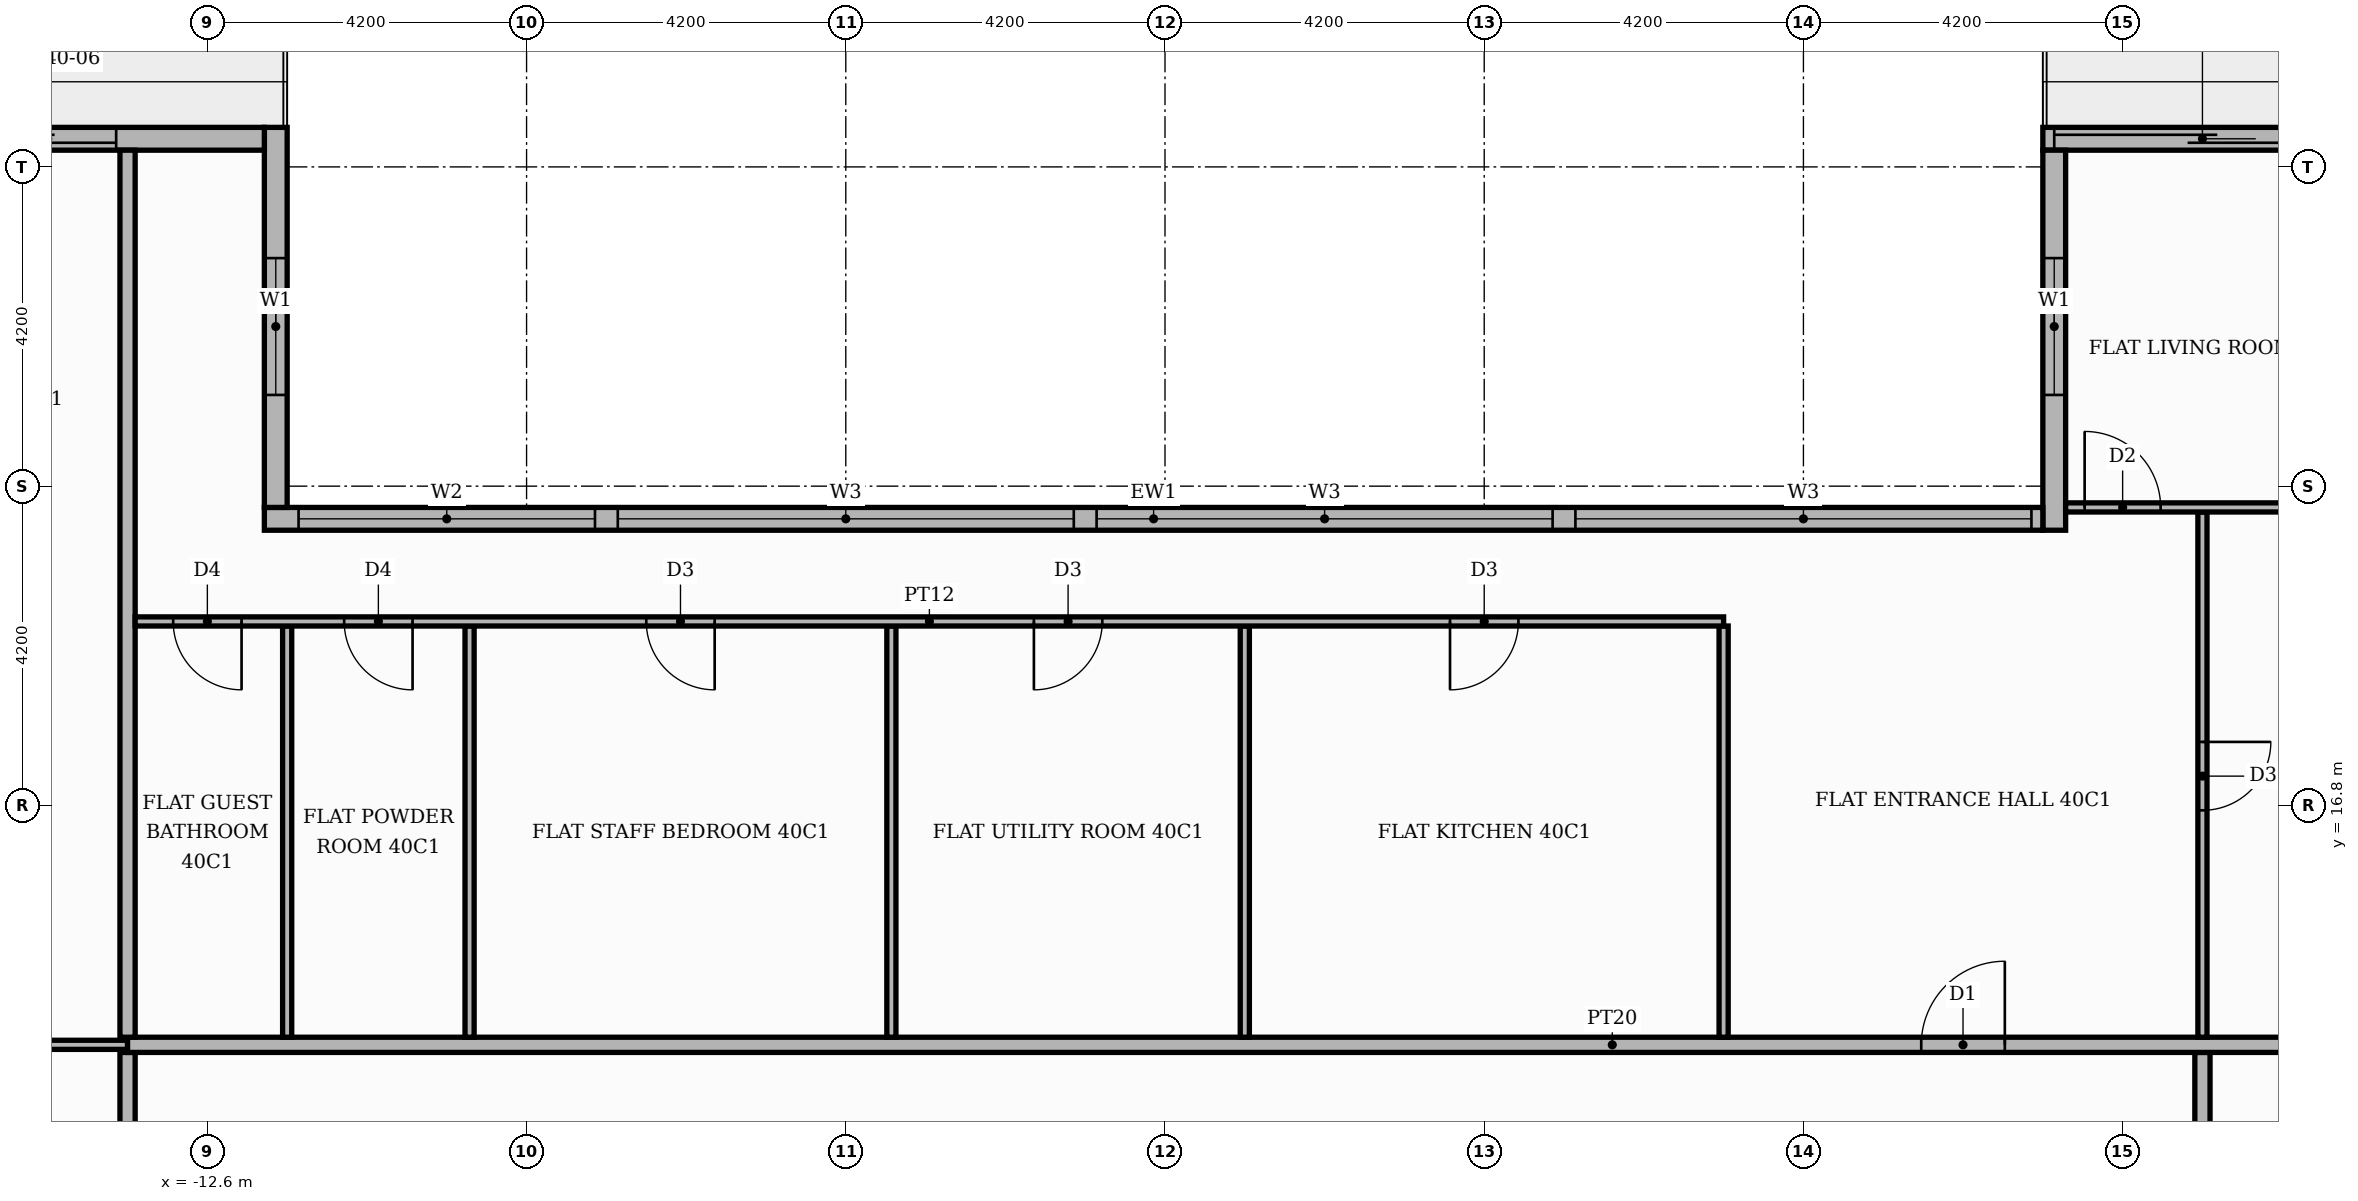
"""IFC4 building model, lengths in metres.
Left out: names, types, materials, properties, quantities, classifications, styles, units other than length and angle.
Written with IfcOpenShell. Run it as: python <this file> out.ifc"""

import sys

from ifc_helpers import new_model, si_unit, direction, frame, frame_2d, origin, place, context, subcontext, project, spatial, rectangle, extrude, element, fill, save


model = new_model("IFC4")
c1 = context("Model", 3, precision=1e-05, world=origin(), true_north=direction((0.0, 1.0)))
c2 = subcontext(c1, "Body", "Model", "MODEL_VIEW")
j1 = project(units=[si_unit("LENGTHUNIT", "METRE"), si_unit("PLANEANGLEUNIT", "RADIAN")], contexts=[c1])
p1 = place(None, origin())
s1 = spatial("IfcSite", under=j1, at=p1, CompositionType="ELEMENT")
p2 = place(p1, origin())
s2 = spatial("IfcBuilding", under=s1, at=p2, CompositionType="ELEMENT")
p3 = place(p2, frame((0.0, 0.0, 168.9)))
s3 = spatial("IfcBuildingStorey", under=s2, at=p3, CompositionType="ELEMENT", Elevation=168.9)
p4 = place(p3, frame((16.2, 25.57, 0.0), z_axis=(0.0, 0.0, 1.0), x_axis=(-1.0, 0.0, 0.0)))
e1 = element("IfcWall", 1, at=p4, inside=s3, PredefinedType="STANDARD", context=c2, shape_type="SweptSolid", body=[
    extrude(rectangle(XDim=4.65, YDim=0.3, at=frame_2d((2.325, 0.0))), origin(), (0.0, 0.0, 1.0), 3.48),
])
p5 = place(p4, frame((0.6, 0.0, 0.0)))
e2 = element("IfcOpeningElement", 2, at=p5, cuts=e1, PredefinedType="OPENING", context=c2, shape_type="SweptSolid", body=[
    extrude(rectangle(XDim=3.9, YDim=2.4, at=frame_2d((1.95, 1.2))), frame((0.0, 0.16, 0.0), z_axis=(0.0, -1.0, 0.0), x_axis=(1.0, 0.0, 0.0)), (0.0, 0.0, 1.0), 0.32),
])
p6 = place(p3, frame((11.7, 25.42, 0.0), z_axis=(0.0, 0.0, 1.0), x_axis=(0.0, -1.0, 0.0)))
e3 = element("IfcWall", 3, at=p6, inside=s3, PredefinedType="STANDARD", context=c2, shape_type="SweptSolid", body=[
    extrude(rectangle(XDim=5.0, YDim=0.3, at=frame_2d((2.5, 0.0))), origin(), (0.0, 0.0, 1.0), 3.48),
])
p7 = place(p6, frame((1.42, 0.0, 0.9)))
e4 = element("IfcOpeningElement", 4, at=p7, cuts=e3, PredefinedType="OPENING", context=c2, shape_type="SweptSolid", body=[
    extrude(rectangle(XDim=1.8, YDim=2.1, at=frame_2d((0.9, 1.05))), frame((0.0, 0.16, 0.0), z_axis=(0.0, -1.0, 0.0), x_axis=(1.0, 0.0, 0.0)), (0.0, 0.0, 1.0), 0.32),
])
p8 = place(p3, frame((11.55, 20.57, 0.0), z_axis=(0.0, 0.0, 1.0), x_axis=(-1.0, 0.0, 0.0)))
e5 = element("IfcWall", 5, at=p8, inside=s3, PredefinedType="STANDARD", context=c2, shape_type="SweptSolid", body=[
    extrude(rectangle(XDim=23.4, YDim=0.3, at=frame_2d((11.7, 0.0))), origin(), (0.0, 0.0, 1.0), 3.48),
])
p9 = place(p8, frame((0.15, 0.0, 0.9)))
e6 = element("IfcOpeningElement", 6, at=p9, cuts=e5, PredefinedType="OPENING", context=c2, shape_type="SweptSolid", body=[
    extrude(rectangle(XDim=6.0, YDim=2.1, at=frame_2d((3.0, 1.05))), frame((0.0, 0.16, 0.0), z_axis=(0.0, -1.0, 0.0), x_axis=(1.0, 0.0, 0.0)), (0.0, 0.0, 1.0), 0.32),
])
p10 = place(p8, frame((6.45, 0.0, 0.9)))
e7 = element("IfcOpeningElement", 7, at=p10, cuts=e5, PredefinedType="OPENING", context=c2, shape_type="SweptSolid", body=[
    extrude(rectangle(XDim=6.0, YDim=2.1, at=frame_2d((3.0, 1.05))), frame((0.0, 0.16, 0.0), z_axis=(0.0, -1.0, 0.0), x_axis=(1.0, 0.0, 0.0)), (0.0, 0.0, 1.0), 0.32),
])
p11 = place(p8, frame((12.75, 0.0, 0.9)))
e8 = element("IfcOpeningElement", 8, at=p11, cuts=e5, PredefinedType="OPENING", context=c2, shape_type="SweptSolid", body=[
    extrude(rectangle(XDim=6.0, YDim=2.1, at=frame_2d((3.0, 1.05))), frame((0.0, 0.16, 0.0), z_axis=(0.0, -1.0, 0.0), x_axis=(1.0, 0.0, 0.0)), (0.0, 0.0, 1.0), 0.32),
])
p12 = place(p8, frame((19.05, 0.0, 0.9)))
e9 = element("IfcOpeningElement", 9, at=p12, cuts=e5, PredefinedType="OPENING", context=c2, shape_type="SweptSolid", body=[
    extrude(rectangle(XDim=3.9, YDim=2.1, at=frame_2d((1.95, 1.05))), frame((0.0, 0.16, 0.0), z_axis=(0.0, -1.0, 0.0), x_axis=(1.0, 0.0, 0.0)), (0.0, 0.0, 1.0), 0.32),
])
p13 = place(p3, frame((-11.7, 20.72, 0.0), z_axis=(0.0, 0.0, 1.0), x_axis=(0.0, 1.0, 0.0)))
e10 = element("IfcWall", 10, at=p13, inside=s3, PredefinedType="STANDARD", context=c2, shape_type="SweptSolid", body=[
    extrude(rectangle(XDim=5.0, YDim=0.3, at=frame_2d((2.5, 0.0))), origin(), (0.0, 0.0, 1.0), 3.48),
])
p14 = place(p13, frame((1.48, 0.0, 0.9)))
e11 = element("IfcOpeningElement", 11, at=p14, cuts=e10, PredefinedType="OPENING", context=c2, shape_type="SweptSolid", body=[
    extrude(rectangle(XDim=1.8, YDim=2.1, at=frame_2d((0.9, 1.05))), frame((0.0, 0.16, 0.0), z_axis=(0.0, -1.0, 0.0), x_axis=(1.0, 0.0, 0.0)), (0.0, 0.0, 1.0), 0.32),
])
p15 = place(p3, frame((-11.85, 25.57, 0.0), z_axis=(0.0, 0.0, 1.0), x_axis=(-1.0, 0.0, 0.0)))
e12 = element("IfcWall", 12, at=p15, inside=s3, PredefinedType="STANDARD", context=c2, shape_type="SweptSolid", body=[
    extrude(rectangle(XDim=4.35, YDim=0.3, at=frame_2d((2.175, 0.0))), origin(), (0.0, 0.0, 1.0), 3.48),
])
p16 = place(p15, frame((1.95, 0.0, 0.0)))
e13 = element("IfcOpeningElement", 13, at=p16, cuts=e12, PredefinedType="OPENING", context=c2, shape_type="SweptSolid", body=[
    extrude(rectangle(XDim=1.8, YDim=2.4, at=frame_2d((0.9, 1.2))), frame((0.0, 0.16, 0.0), z_axis=(0.0, -1.0, 0.0), x_axis=(1.0, 0.0, 0.0)), (0.0, 0.0, 1.0), 0.32),
])
for number, where, z_axis, x_axis in (
    (14, (-13.65, 11.1, 0.0), (0.0, 0.0, 1.0), (0.0, 1.0, 0.0)),
    (15, (13.65, 11.1, 0.0), (0.0, 0.0, 1.0), (0.0, 1.0, 0.0)),
):
    element("IfcWall", number, at=place(p3, frame(where, z_axis=z_axis, x_axis=x_axis)), inside=s3, PredefinedType="PARTITIONING", context=c2, shape_type="SweptSolid", body=[
        extrude(rectangle(XDim=2.45, YDim=0.2, at=frame_2d((1.225, 0.0))), origin(), (0.0, 0.0, 1.0), 3.48),
    ])
p17 = place(p3, frame((-20.72, 13.65, 0.0), z_axis=(0.0, 0.0, 1.0), x_axis=(1.0, 0.0, 0.0)))
e16 = element("IfcWall", 16, at=p17, inside=s3, PredefinedType="PARTITIONING", context=c2, shape_type="SweptSolid", body=[
    extrude(rectangle(XDim=7.07, YDim=0.12, at=frame_2d((3.535, 0.0))), origin(), (0.0, 0.0, 1.0), 3.48),
])
p18 = place(p17, frame((3.085, 0.0, 0.0)))
e17 = element("IfcOpeningElement", 17, at=p18, cuts=e16, PredefinedType="OPENING", context=c2, shape_type="SweptSolid", body=[
    extrude(rectangle(XDim=0.9, YDim=2.1, at=frame_2d((0.45, 1.05))), frame((0.0, 0.07, 0.0), z_axis=(0.0, -1.0, 0.0), x_axis=(1.0, 0.0, 0.0)), (0.0, 0.0, 1.0), 0.14),
])
p19 = place(p3, frame((-13.65, 13.65, 0.0), z_axis=(0.0, 0.0, 1.0), x_axis=(1.0, 0.0, 0.0)))
e18 = element("IfcWall", 18, at=p19, inside=s3, PredefinedType="PARTITIONING", context=c2, shape_type="SweptSolid", body=[
    extrude(rectangle(XDim=39.07, YDim=0.2, at=frame_2d((19.535, 0.0))), origin(), (0.0, 0.0, 1.0), 3.48),
])
p20 = place(p19, frame((23.6, 0.0, 0.0)))
e19 = element("IfcOpeningElement", 19, at=p20, cuts=e18, PredefinedType="OPENING", context=c2, shape_type="SweptSolid", body=[
    extrude(rectangle(XDim=1.1, YDim=2.4, at=frame_2d((0.55, 1.2))), frame((0.0, 0.11, 0.0), z_axis=(0.0, -1.0, 0.0), x_axis=(1.0, 0.0, 0.0)), (0.0, 0.0, 1.0), 0.22),
])
p21 = place(p3, frame((-13.65, 13.75, 0.0), z_axis=(0.0, 0.0, 1.0), x_axis=(0.0, 1.0, 0.0)))
e20 = element("IfcWall", 20, at=p21, inside=s3, PredefinedType="PARTITIONING", context=c2, shape_type="SweptSolid", body=[
    extrude(rectangle(XDim=11.67, YDim=0.2, at=frame_2d((5.835, 0.0))), origin(), (0.0, 0.0, 1.0), 3.48),
])
for number, where, z_axis, x_axis in (
    (21, (-11.55, 13.75, 0.0), (0.0, 0.0, 1.0), (0.0, 1.0, 0.0)),
    (22, (-9.15, 13.75, 0.0), (0.0, 0.0, 1.0), (0.0, 1.0, 0.0)),
    (23, (-3.6, 13.75, 0.0), (0.0, 0.0, 1.0), (0.0, 1.0, 0.0)),
    (24, (1.05, 13.75, 0.0), (0.0, 0.0, 1.0), (0.0, 1.0, 0.0)),
    (25, (7.35, 13.75, 0.0), (0.0, 0.0, 1.0), (0.0, 1.0, 0.0)),
):
    element("IfcWall", number, at=place(p3, frame(where, z_axis=z_axis, x_axis=x_axis)), inside=s3, PredefinedType="PARTITIONING", context=c2, shape_type="SweptSolid", body=[
        extrude(rectangle(XDim=5.41, YDim=0.12, at=frame_2d((2.705, 0.0))), origin(), (0.0, 0.0, 1.0), 3.48),
    ])
p22 = place(p3, frame((13.65, 13.75, 0.0), z_axis=(0.0, 0.0, 1.0), x_axis=(0.0, 1.0, 0.0)))
e26 = element("IfcWall", 26, at=p22, inside=s3, PredefinedType="PARTITIONING", context=c2, shape_type="SweptSolid", body=[
    extrude(rectangle(XDim=6.91, YDim=0.12, at=frame_2d((3.455, 0.0))), origin(), (0.0, 0.0, 1.0), 3.48),
])
p23 = place(p22, frame((2.985, 0.0, 0.0)))
e27 = element("IfcOpeningElement", 27, at=p23, cuts=e26, PredefinedType="OPENING", context=c2, shape_type="SweptSolid", body=[
    extrude(rectangle(XDim=0.9, YDim=2.1, at=frame_2d((0.45, 1.05))), frame((0.0, 0.07, 0.0), z_axis=(0.0, -1.0, 0.0), x_axis=(1.0, 0.0, 0.0)), (0.0, 0.0, 1.0), 0.14),
])
p24 = place(p3, frame((-13.55, 19.22, 0.0), z_axis=(0.0, 0.0, 1.0), x_axis=(1.0, 0.0, 0.0)))
e28 = element("IfcWall", 28, at=p24, inside=s3, PredefinedType="PARTITIONING", context=c2, shape_type="SweptSolid", body=[
    extrude(rectangle(XDim=20.9, YDim=0.12, at=frame_2d((10.45, 0.0))), origin(), (0.0, 0.0, 1.0), 3.48),
])
p25 = place(p24, frame((17.3, 0.0, 0.0)))
e29 = element("IfcOpeningElement", 29, at=p25, cuts=e28, PredefinedType="OPENING", context=c2, shape_type="SweptSolid", body=[
    extrude(rectangle(XDim=0.9, YDim=2.1, at=frame_2d((0.45, 1.05))), frame((0.0, 0.07, 0.0), z_axis=(0.0, -1.0, 0.0), x_axis=(1.0, 0.0, 0.0)), (0.0, 0.0, 1.0), 0.14),
])
p26 = place(p24, frame((11.825, 0.0, 0.0)))
e30 = element("IfcOpeningElement", 30, at=p26, cuts=e28, PredefinedType="OPENING", context=c2, shape_type="SweptSolid", body=[
    extrude(rectangle(XDim=0.9, YDim=2.1, at=frame_2d((0.45, 1.05))), frame((0.0, 0.07, 0.0), z_axis=(0.0, -1.0, 0.0), x_axis=(1.0, 0.0, 0.0)), (0.0, 0.0, 1.0), 0.14),
])
p27 = place(p24, frame((6.725, 0.0, 0.0)))
e31 = element("IfcOpeningElement", 31, at=p27, cuts=e28, PredefinedType="OPENING", context=c2, shape_type="SweptSolid", body=[
    extrude(rectangle(XDim=0.9, YDim=2.1, at=frame_2d((0.45, 1.05))), frame((0.0, 0.07, 0.0), z_axis=(0.0, -1.0, 0.0), x_axis=(1.0, 0.0, 0.0)), (0.0, 0.0, 1.0), 0.14),
])
p28 = place(p24, frame((2.75, 0.0, 0.0)))
e32 = element("IfcOpeningElement", 32, at=p28, cuts=e28, PredefinedType="OPENING", context=c2, shape_type="SweptSolid", body=[
    extrude(rectangle(XDim=0.9, YDim=2.1, at=frame_2d((0.45, 1.05))), frame((0.0, 0.07, 0.0), z_axis=(0.0, -1.0, 0.0), x_axis=(1.0, 0.0, 0.0)), (0.0, 0.0, 1.0), 0.14),
])
p29 = place(p24, frame((0.5, 0.0, 0.0)))
e33 = element("IfcOpeningElement", 33, at=p29, cuts=e28, PredefinedType="OPENING", context=c2, shape_type="SweptSolid", body=[
    extrude(rectangle(XDim=0.9, YDim=2.1, at=frame_2d((0.45, 1.05))), frame((0.0, 0.07, 0.0), z_axis=(0.0, -1.0, 0.0), x_axis=(1.0, 0.0, 0.0)), (0.0, 0.0, 1.0), 0.14),
])
p30 = place(p3, frame((11.85, 20.72, 0.0), z_axis=(0.0, 0.0, 1.0), x_axis=(1.0, 0.0, 0.0)))
e34 = element("IfcWall", 34, at=p30, inside=s3, PredefinedType="PARTITIONING", context=c2, shape_type="SweptSolid", body=[
    extrude(rectangle(XDim=13.57, YDim=0.12, at=frame_2d((6.785, 0.0))), origin(), (0.0, 0.0, 1.0), 3.48),
])
p31 = place(p30, frame((0.25, 0.0, 0.0)))
e35 = element("IfcOpeningElement", 35, at=p31, cuts=e34, PredefinedType="OPENING", context=c2, shape_type="SweptSolid", body=[
    extrude(rectangle(XDim=1.0, YDim=2.1, at=frame_2d((0.5, 1.05))), frame((0.0, 0.07, 0.0), z_axis=(0.0, -1.0, 0.0), x_axis=(1.0, 0.0, 0.0)), (0.0, 0.0, 1.0), 0.14),
])
p32 = place(p5, origin())
e36 = element("IfcDoor", 36, at=p32, inside=s3, OperationType="SLIDING_TO_LEFT", PredefinedType="DOOR", context=c2, shape_type="SweptSolid", body=[
    extrude(rectangle(XDim=3.9, YDim=2.4, at=frame_2d((1.95, 1.2))), frame((0.0, 0.025, 0.0), z_axis=(0.0, -1.0, 0.0), x_axis=(1.0, 0.0, 0.0)), (0.0, 0.0, 1.0), 0.05),
])
fill(e2, e36)
p33 = place(p7, origin())
e37 = element("IfcWindow", 37, at=p33, inside=s3, PartitioningType="SINGLE_PANEL", PredefinedType="WINDOW", context=c2, shape_type="SweptSolid", body=[
    extrude(rectangle(XDim=1.8, YDim=2.1, at=frame_2d((0.9, 1.05))), frame((0.0, 0.03, 0.0), z_axis=(0.0, -1.0, 0.0), x_axis=(1.0, 0.0, 0.0)), (0.0, 0.0, 1.0), 0.06),
])
fill(e4, e37)
p34 = place(p9, origin())
e38 = element("IfcWindow", 38, at=p34, inside=s3, PartitioningType="SINGLE_PANEL", PredefinedType="WINDOW", context=c2, shape_type="SweptSolid", body=[
    extrude(rectangle(XDim=6.0, YDim=2.1, at=frame_2d((3.0, 1.05))), frame((0.0, 0.03, 0.0), z_axis=(0.0, -1.0, 0.0), x_axis=(1.0, 0.0, 0.0)), (0.0, 0.0, 1.0), 0.06),
])
fill(e6, e38)
p35 = place(p10, origin())
e39 = element("IfcWindow", 39, at=p35, inside=s3, PartitioningType="SINGLE_PANEL", PredefinedType="WINDOW", context=c2, shape_type="SweptSolid", body=[
    extrude(rectangle(XDim=6.0, YDim=2.1, at=frame_2d((3.0, 1.05))), frame((0.0, 0.03, 0.0), z_axis=(0.0, -1.0, 0.0), x_axis=(1.0, 0.0, 0.0)), (0.0, 0.0, 1.0), 0.06),
])
fill(e7, e39)
p36 = place(p11, origin())
e40 = element("IfcWindow", 40, at=p36, inside=s3, PartitioningType="SINGLE_PANEL", PredefinedType="WINDOW", context=c2, shape_type="SweptSolid", body=[
    extrude(rectangle(XDim=6.0, YDim=2.1, at=frame_2d((3.0, 1.05))), frame((0.0, 0.03, 0.0), z_axis=(0.0, -1.0, 0.0), x_axis=(1.0, 0.0, 0.0)), (0.0, 0.0, 1.0), 0.06),
])
fill(e8, e40)
p37 = place(p12, origin())
e41 = element("IfcWindow", 41, at=p37, inside=s3, PartitioningType="SINGLE_PANEL", PredefinedType="WINDOW", context=c2, shape_type="SweptSolid", body=[
    extrude(rectangle(XDim=3.9, YDim=2.1, at=frame_2d((1.95, 1.05))), frame((0.0, 0.03, 0.0), z_axis=(0.0, -1.0, 0.0), x_axis=(1.0, 0.0, 0.0)), (0.0, 0.0, 1.0), 0.06),
])
fill(e9, e41)
p38 = place(p14, origin())
e42 = element("IfcWindow", 42, at=p38, inside=s3, PartitioningType="SINGLE_PANEL", PredefinedType="WINDOW", context=c2, shape_type="SweptSolid", body=[
    extrude(rectangle(XDim=1.8, YDim=2.1, at=frame_2d((0.9, 1.05))), frame((0.0, 0.03, 0.0), z_axis=(0.0, -1.0, 0.0), x_axis=(1.0, 0.0, 0.0)), (0.0, 0.0, 1.0), 0.06),
])
fill(e11, e42)
p39 = place(p16, origin())
e43 = element("IfcDoor", 43, at=p39, inside=s3, OperationType="SLIDING_TO_RIGHT", PredefinedType="DOOR", context=c2, shape_type="SweptSolid", body=[
    extrude(rectangle(XDim=1.8, YDim=2.4, at=frame_2d((0.9, 1.2))), frame((0.0, 0.025, 0.0), z_axis=(0.0, -1.0, 0.0), x_axis=(1.0, 0.0, 0.0)), (0.0, 0.0, 1.0), 0.05),
])
fill(e13, e43)
p40 = place(p20, origin())
e44 = element("IfcDoor", 44, at=p40, inside=s3, OperationType="SINGLE_SWING_RIGHT", PredefinedType="DOOR", context=c2, shape_type="SweptSolid", body=[
    extrude(rectangle(XDim=1.1, YDim=2.4, at=frame_2d((0.55, 1.2))), frame((0.0, 0.025, 0.0), z_axis=(0.0, -1.0, 0.0), x_axis=(1.0, 0.0, 0.0)), (0.0, 0.0, 1.0), 0.05),
])
fill(e19, e44)
p41 = place(p23, frame((0.9, 0.0, 0.0), z_axis=(0.0, 0.0, 1.0), x_axis=(-1.0, 0.0, 0.0)))
e45 = element("IfcDoor", 45, at=p41, inside=s3, OperationType="SINGLE_SWING_RIGHT", PredefinedType="DOOR", context=c2, shape_type="SweptSolid", body=[
    extrude(rectangle(XDim=0.9, YDim=2.1, at=frame_2d((0.45, 1.05))), frame((0.0, 0.025, 0.0), z_axis=(0.0, -1.0, 0.0), x_axis=(1.0, 0.0, 0.0)), (0.0, 0.0, 1.0), 0.05),
])
fill(e27, e45)
p42 = place(p25, frame((0.9, 0.0, 0.0), z_axis=(0.0, 0.0, 1.0), x_axis=(-1.0, 0.0, 0.0)))
e46 = element("IfcDoor", 46, at=p42, inside=s3, OperationType="SINGLE_SWING_LEFT", PredefinedType="DOOR", context=c2, shape_type="SweptSolid", body=[
    extrude(rectangle(XDim=0.9, YDim=2.1, at=frame_2d((0.45, 1.05))), frame((0.0, 0.025, 0.0), z_axis=(0.0, -1.0, 0.0), x_axis=(1.0, 0.0, 0.0)), (0.0, 0.0, 1.0), 0.05),
])
fill(e29, e46)
p43 = place(p26, frame((0.9, 0.0, 0.0), z_axis=(0.0, 0.0, 1.0), x_axis=(-1.0, 0.0, 0.0)))
e47 = element("IfcDoor", 47, at=p43, inside=s3, OperationType="SINGLE_SWING_LEFT", PredefinedType="DOOR", context=c2, shape_type="SweptSolid", body=[
    extrude(rectangle(XDim=0.9, YDim=2.1, at=frame_2d((0.45, 1.05))), frame((0.0, 0.025, 0.0), z_axis=(0.0, -1.0, 0.0), x_axis=(1.0, 0.0, 0.0)), (0.0, 0.0, 1.0), 0.05),
])
fill(e30, e47)
p44 = place(p27, frame((0.9, 0.0, 0.0), z_axis=(0.0, 0.0, 1.0), x_axis=(-1.0, 0.0, 0.0)))
e48 = element("IfcDoor", 48, at=p44, inside=s3, OperationType="SINGLE_SWING_RIGHT", PredefinedType="DOOR", context=c2, shape_type="SweptSolid", body=[
    extrude(rectangle(XDim=0.9, YDim=2.1, at=frame_2d((0.45, 1.05))), frame((0.0, 0.025, 0.0), z_axis=(0.0, -1.0, 0.0), x_axis=(1.0, 0.0, 0.0)), (0.0, 0.0, 1.0), 0.05),
])
fill(e31, e48)
p45 = place(p28, frame((0.9, 0.0, 0.0), z_axis=(0.0, 0.0, 1.0), x_axis=(-1.0, 0.0, 0.0)))
e49 = element("IfcDoor", 49, at=p45, inside=s3, OperationType="SINGLE_SWING_RIGHT", PredefinedType="DOOR", context=c2, shape_type="SweptSolid", body=[
    extrude(rectangle(XDim=0.9, YDim=2.1, at=frame_2d((0.45, 1.05))), frame((0.0, 0.025, 0.0), z_axis=(0.0, -1.0, 0.0), x_axis=(1.0, 0.0, 0.0)), (0.0, 0.0, 1.0), 0.05),
])
fill(e32, e49)
p46 = place(p29, frame((0.9, 0.0, 0.0), z_axis=(0.0, 0.0, 1.0), x_axis=(-1.0, 0.0, 0.0)))
e50 = element("IfcDoor", 50, at=p46, inside=s3, OperationType="SINGLE_SWING_RIGHT", PredefinedType="DOOR", context=c2, shape_type="SweptSolid", body=[
    extrude(rectangle(XDim=0.9, YDim=2.1, at=frame_2d((0.45, 1.05))), frame((0.0, 0.025, 0.0), z_axis=(0.0, -1.0, 0.0), x_axis=(1.0, 0.0, 0.0)), (0.0, 0.0, 1.0), 0.05),
])
fill(e33, e50)
p47 = place(p31, origin())
e51 = element("IfcDoor", 51, at=p47, inside=s3, OperationType="SINGLE_SWING_LEFT", PredefinedType="DOOR", context=c2, shape_type="SweptSolid", body=[
    extrude(rectangle(XDim=1.0, YDim=2.1, at=frame_2d((0.5, 1.05))), frame((0.0, 0.025, 0.0), z_axis=(0.0, -1.0, 0.0), x_axis=(1.0, 0.0, 0.0)), (0.0, 0.0, 1.0), 0.05),
])
fill(e35, e51)
save(model, sys.argv[1])
